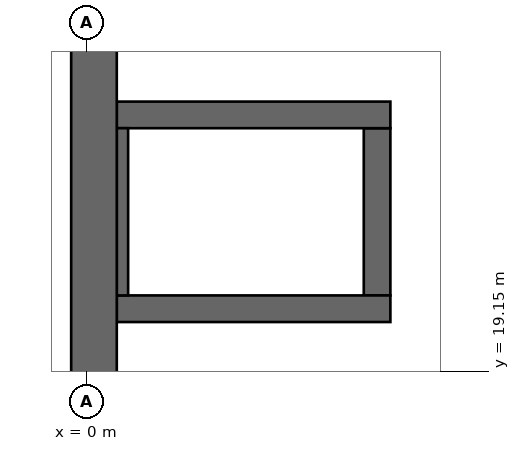
"""IFC4 building model, lengths in metres.
Left out: names, types, materials, properties, quantities, classifications, styles, units other than length and angle.
Written with IfcOpenShell. Run it as: python <this file> out.ifc"""

import sys

from ifc_helpers import new_model, si_unit, direction, frame, frame_2d, origin, place, context, subcontext, project, spatial, rectangle, extrude, element, save


model = new_model("IFC4")
c1 = context("Model", 3, precision=1e-05, world=origin(), true_north=direction((0.0, 1.0)))
c2 = subcontext(c1, "Body", "Model", "MODEL_VIEW")
j1 = project(units=[si_unit("LENGTHUNIT", "METRE"), si_unit("PLANEANGLEUNIT", "RADIAN")], contexts=[c1])
p1 = place(None, origin())
s1 = spatial("IfcSite", under=j1, at=p1, CompositionType="ELEMENT")
p2 = place(p1, origin())
s2 = spatial("IfcBuilding", under=s1, at=p2, CompositionType="ELEMENT")
p3 = place(p2, frame((0.0, 0.0, -5.5)))
s3 = spatial("IfcBuildingStorey", under=s2, at=p3, CompositionType="ELEMENT", Elevation=-5.5)
p4 = place(p3, frame((0.101, -0.2, 0.0), z_axis=(0.0, 0.0, 1.0), x_axis=(0.0, 1.0, 0.0)))
e1 = element("IfcWall", 1, at=p4, inside=s3, PredefinedType="SOLIDWALL", context=c2, shape_type="SweptSolid", body=[
    extrude(rectangle(XDim=46.88, YDim=0.6, at=frame_2d((23.44, 0.0))), origin(), (0.0, 0.0, 1.0), 5.5),
])
for number, where, z_axis, x_axis in (
    (2, (0.4, 19.975, 0.0), (0.0, 0.0, 1.0), (1.0, 0.0, 0.0)),
    (3, (0.4, 22.525, 0.0), (0.0, 0.0, 1.0), (1.0, 0.0, 0.0)),
):
    element("IfcWall", number, at=place(p3, frame(where, z_axis=z_axis, x_axis=x_axis)), inside=s3, PredefinedType="SHEAR", context=c2, shape_type="SweptSolid", body=[
        extrude(rectangle(XDim=3.6, YDim=0.35, at=frame_2d((1.8, 0.0))), origin(), (0.0, 0.0, 1.0), 5.5),
    ])
p5 = place(p3, frame((0.475, 20.15, 0.0), z_axis=(0.0, 0.0, 1.0), x_axis=(0.0, 1.0, 0.0)))
e4 = element("IfcWall", 4, at=p5, inside=s3, PredefinedType="SHEAR", context=c2, shape_type="SweptSolid", body=[
    extrude(rectangle(XDim=2.2, YDim=0.15, at=frame_2d((1.1, 0.0))), origin(), (0.0, 0.0, 1.0), 5.5),
])
p6 = place(p3, frame((3.825, 20.15, 0.0), z_axis=(0.0, 0.0, 1.0), x_axis=(0.0, 1.0, 0.0)))
e5 = element("IfcWall", 5, at=p6, inside=s3, PredefinedType="SHEAR", context=c2, shape_type="SweptSolid", body=[
    extrude(rectangle(XDim=2.2, YDim=0.35, at=frame_2d((1.1, 0.0))), origin(), (0.0, 0.0, 1.0), 5.5),
])
save(model, sys.argv[1])
